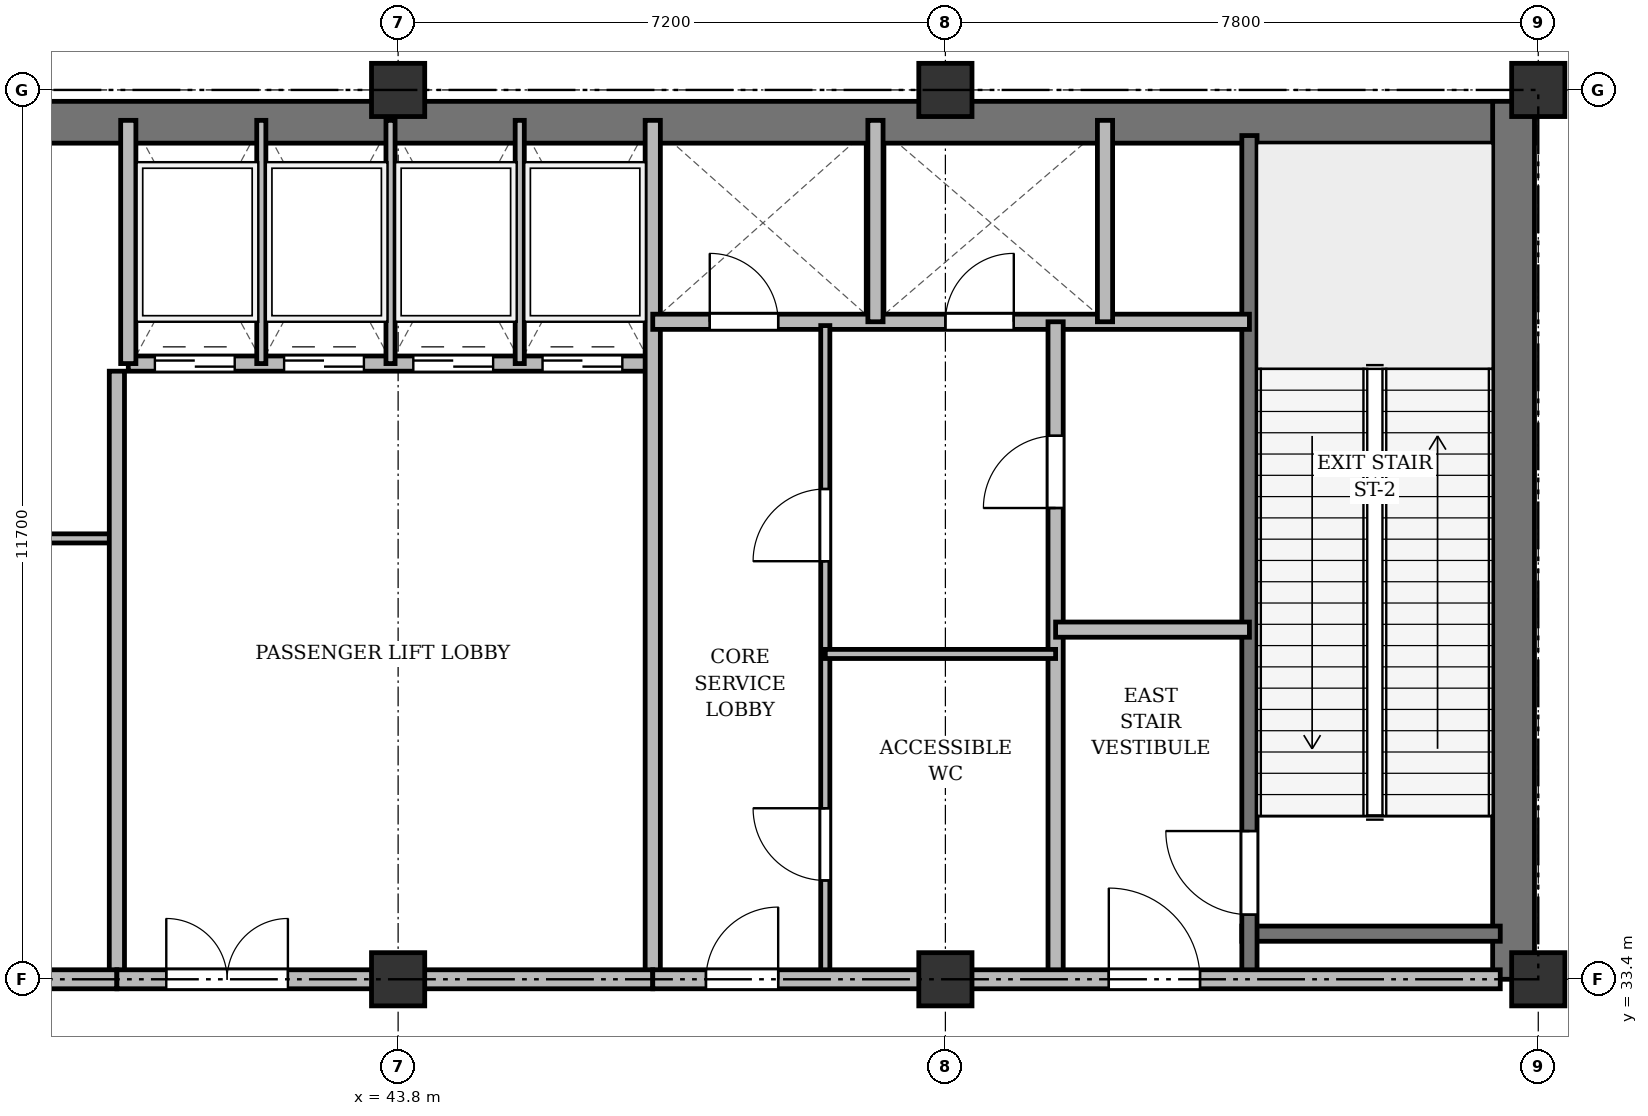
"""IFC4 building model, lengths in metres.
Left out: names, types, materials, properties, quantities, classifications, styles, units other than length and angle.
Written with IfcOpenShell. Run it as: python <this file> out.ifc"""

import sys

from ifc_helpers import new_model, si_unit, direction, frame, frame_2d, origin, origin_2d, place, context, subcontext, project, spatial, rectangle, extrude, source, transform, mapped, element, fill, save


model = new_model("IFC4")
c1 = context("Model", 3, precision=1e-05, world=origin(), true_north=direction((0.0, 1.0)))
c2 = subcontext(c1, "Body", "Model", "MODEL_VIEW")
j1 = project(units=[si_unit("LENGTHUNIT", "METRE"), si_unit("PLANEANGLEUNIT", "RADIAN")], contexts=[c1])
p1 = place(None, origin())
s1 = spatial("IfcSite", under=j1, at=p1, CompositionType="ELEMENT")
p2 = place(p1, origin())
s2 = spatial("IfcBuilding", under=s1, at=p2, CompositionType="ELEMENT")
p3 = place(p2, frame((0.0, 0.0, 240.9)))
s3 = spatial("IfcBuildingStorey", under=s2, at=p3, CompositionType="ELEMENT", Elevation=240.9)
m1 = source(origin(), c2, "Body", "SweptSolid", [
    extrude(rectangle(XDim=0.7, YDim=0.7, at=origin_2d()), origin(), (0.0, 0.0, 1.0), 7.8),
])
for number, where, z_axis, x_axis in (
    (1, (43.8, 33.4, 0.0), (0.0, 0.0, 1.0), (1.0, 0.0, 0.0)),
    (2, (43.8, 45.1, 0.0), (0.0, 0.0, 1.0), (1.0, 0.0, 0.0)),
    (3, (51.0, 33.4, 0.0), (0.0, 0.0, 1.0), (1.0, 0.0, 0.0)),
    (4, (51.0, 45.1, 0.0), (0.0, 0.0, 1.0), (1.0, 0.0, 0.0)),
    (5, (58.8, 33.4, 0.0), (0.0, 0.0, 1.0), (1.0, 0.0, 0.0)),
    (6, (58.8, 45.1, 0.0), (0.0, 0.0, 1.0), (1.0, 0.0, 0.0)),
):
    element("IfcColumn", number, at=place(p3, frame(where, z_axis=z_axis, x_axis=x_axis)), inside=s3, PredefinedType="COLUMN", context=c2, shape_type="MappedRepresentation", body=[
        mapped(m1, transform((0.0, 0.0, 0.0), x_axis=(1.0, 0.0, 0.0), y_axis=(0.0, 1.0, 0.0), z_axis=(0.0, 0.0, 1.0), scale=1.0)),
    ])
p4 = place(p3, frame((15.65, 44.675, 0.0), z_axis=(0.0, 0.0, 1.0), x_axis=(1.0, 0.0, 0.0)))
e7 = element("IfcWall", 7, at=p4, inside=s3, PredefinedType="SHEAR", context=c2, shape_type="SweptSolid", body=[
    extrude(rectangle(XDim=43.1, YDim=0.55, at=frame_2d((21.55, 0.0))), origin(), (0.0, 0.0, 1.0), 7.44),
])
p5 = place(p3, frame((58.475, 33.4, 0.0), z_axis=(0.0, 0.0, 1.0), x_axis=(0.0, 1.0, 0.0)))
e8 = element("IfcWall", 8, at=p5, inside=s3, PredefinedType="SHEAR", context=c2, shape_type="SweptSolid", body=[
    extrude(rectangle(XDim=11.55, YDim=0.55, at=frame_2d((5.775, 0.0))), origin(), (0.0, 0.0, 1.0), 7.44),
])
p6 = place(p3, frame((54.9, 34.0, 0.0), z_axis=(0.0, 0.0, 1.0), x_axis=(1.0, 0.0, 0.0)))
e9 = element("IfcWall", 9, at=p6, inside=s3, PredefinedType="SHEAR", context=c2, shape_type="SweptSolid", body=[
    extrude(rectangle(XDim=3.4, YDim=0.2, at=frame_2d((1.7, 0.0))), origin(), (0.0, 0.0, 1.0), 7.44),
])
p7 = place(p3, frame((55.0, 33.4, 0.0), z_axis=(0.0, 0.0, 1.0), x_axis=(0.0, 1.0, 0.0)))
e10 = element("IfcWall", 10, at=p7, inside=s3, PredefinedType="SHEAR", context=c2, shape_type="SweptSolid", body=[
    extrude(rectangle(XDim=11.1, YDim=0.2, at=frame_2d((5.55, 0.0))), origin(), (0.0, 0.0, 1.0), 7.44),
])
p8 = place(p7, frame((0.85, 0.0, 0.0)))
e11 = element("IfcOpeningElement", 11, at=p8, cuts=e10, PredefinedType="OPENING", context=c2, shape_type="SweptSolid", body=[
    extrude(rectangle(XDim=1.1, YDim=2.15, at=frame_2d((0.55, 1.075))), frame((0.0, 0.11, 0.0), z_axis=(0.0, -1.0, 0.0), x_axis=(1.0, 0.0, 0.0)), (0.0, 0.0, 1.0), 0.22),
])
p9 = place(p3, frame((33.3, 39.2, 0.0), z_axis=(0.0, 0.0, 1.0), x_axis=(1.0, 0.0, 0.0)))
e12 = element("IfcWall", 12, at=p9, inside=s3, PredefinedType="PARTITIONING", context=c2, shape_type="SweptSolid", body=[
    extrude(rectangle(XDim=6.8, YDim=0.12, at=frame_2d((3.4, 0.0))), origin(), (0.0, 0.0, 1.0), 7.44),
])
p10 = place(p9, frame((2.6, 0.0, 0.0)))
e13 = element("IfcOpeningElement", 13, at=p10, cuts=e12, PredefinedType="OPENING", context=c2, shape_type="SweptSolid", body=[
    extrude(rectangle(XDim=0.95, YDim=2.15, at=frame_2d((0.475, 1.075))), frame((0.0, 0.07, 0.0), z_axis=(0.0, -1.0, 0.0), x_axis=(1.0, 0.0, 0.0)), (0.0, 0.0, 1.0), 0.14),
])
p11 = place(p3, frame((40.1, 33.4, 0.0), z_axis=(0.0, 0.0, 1.0), x_axis=(0.0, 1.0, 0.0)))
e14 = element("IfcWall", 14, at=p11, inside=s3, PredefinedType="SOLIDWALL", context=c2, shape_type="SweptSolid", body=[
    extrude(rectangle(XDim=8.0, YDim=0.2, at=frame_2d((4.0, 0.0))), origin(), (0.0, 0.0, 1.0), 6.99),
])
p12 = place(p3, frame((40.25, 41.5, 0.0), z_axis=(0.0, 0.0, 1.0), x_axis=(1.0, 0.0, 0.0)))
e15 = element("IfcWall", 15, at=p12, inside=s3, PredefinedType="SOLIDWALL", context=c2, shape_type="SweptSolid", body=[
    extrude(rectangle(XDim=6.9, YDim=0.2, at=frame_2d((3.45, 0.0))), origin(), (0.0, 0.0, 1.0), 7.44),
])
p13 = place(p12, frame((0.35, 0.0, 0.0)))
e16 = element("IfcOpeningElement", 16, at=p13, cuts=e15, PredefinedType="OPENING", context=c2, shape_type="SweptSolid", body=[
    extrude(rectangle(XDim=1.05, YDim=2.15, at=frame_2d((0.525, 1.075))), frame((0.0, 0.11, 0.0), z_axis=(0.0, -1.0, 0.0), x_axis=(1.0, 0.0, 0.0)), (0.0, 0.0, 1.0), 0.22),
])
p14 = place(p12, frame((2.05, 0.0, 0.0)))
e17 = element("IfcOpeningElement", 17, at=p14, cuts=e15, PredefinedType="OPENING", context=c2, shape_type="SweptSolid", body=[
    extrude(rectangle(XDim=1.05, YDim=2.15, at=frame_2d((0.525, 1.075))), frame((0.0, 0.11, 0.0), z_axis=(0.0, -1.0, 0.0), x_axis=(1.0, 0.0, 0.0)), (0.0, 0.0, 1.0), 0.22),
])
p15 = place(p12, frame((3.75, 0.0, 0.0)))
e18 = element("IfcOpeningElement", 18, at=p15, cuts=e15, PredefinedType="OPENING", context=c2, shape_type="SweptSolid", body=[
    extrude(rectangle(XDim=1.05, YDim=2.15, at=frame_2d((0.525, 1.075))), frame((0.0, 0.11, 0.0), z_axis=(0.0, -1.0, 0.0), x_axis=(1.0, 0.0, 0.0)), (0.0, 0.0, 1.0), 0.22),
])
p16 = place(p12, frame((5.45, 0.0, 0.0)))
e19 = element("IfcOpeningElement", 19, at=p16, cuts=e15, PredefinedType="OPENING", context=c2, shape_type="SweptSolid", body=[
    extrude(rectangle(XDim=1.05, YDim=2.15, at=frame_2d((0.525, 1.075))), frame((0.0, 0.11, 0.0), z_axis=(0.0, -1.0, 0.0), x_axis=(1.0, 0.0, 0.0)), (0.0, 0.0, 1.0), 0.22),
])
p17 = place(p3, frame((40.25, 41.5, 0.0), z_axis=(0.0, 0.0, 1.0), x_axis=(0.0, 1.0, 0.0)))
e20 = element("IfcWall", 20, at=p17, inside=s3, PredefinedType="SOLIDWALL", context=c2, shape_type="SweptSolid", body=[
    extrude(rectangle(XDim=3.2, YDim=0.2, at=frame_2d((1.6, 0.0))), origin(), (0.0, 0.0, 1.0), 7.44),
])
for number, where, z_axis, x_axis in (
    (21, (42.0, 41.5, 0.0), (0.0, 0.0, 1.0), (0.0, 1.0, 0.0)),
    (22, (43.7, 41.5, 0.0), (0.0, 0.0, 1.0), (0.0, 1.0, 0.0)),
    (23, (45.4, 41.5, 0.0), (0.0, 0.0, 1.0), (0.0, 1.0, 0.0)),
):
    element("IfcWall", number, at=place(p3, frame(where, z_axis=z_axis, x_axis=x_axis)), inside=s3, PredefinedType="PARTITIONING", context=c2, shape_type="SweptSolid", body=[
        extrude(rectangle(XDim=3.2, YDim=0.12, at=frame_2d((1.6, 0.0))), origin(), (0.0, 0.0, 1.0), 7.44),
    ])
p18 = place(p3, frame((47.15, 33.4, 0.0), z_axis=(0.0, 0.0, 1.0), x_axis=(0.0, 1.0, 0.0)))
e24 = element("IfcWall", 24, at=p18, inside=s3, PredefinedType="SOLIDWALL", context=c2, shape_type="SweptSolid", body=[
    extrude(rectangle(XDim=11.3, YDim=0.2, at=frame_2d((5.65, 0.0))), origin(), (0.0, 0.0, 1.0), 6.99),
])
p19 = place(p3, frame((33.3, 33.4, 0.0), z_axis=(0.0, 0.0, 1.0), x_axis=(1.0, 0.0, 0.0)))
e25 = element("IfcWall", 25, at=p19, inside=s3, PredefinedType="PARTITIONING", context=c2, shape_type="SweptSolid", body=[
    extrude(rectangle(XDim=6.8, YDim=0.25, at=frame_2d((3.4, 0.0))), origin(), (0.0, 0.0, 1.0), 6.99),
])
p20 = place(p19, frame((2.4, 0.0, 0.0)))
e26 = element("IfcOpeningElement", 26, at=p20, cuts=e25, PredefinedType="OPENING", context=c2, shape_type="SweptSolid", body=[
    extrude(rectangle(XDim=1.0, YDim=2.15, at=frame_2d((0.5, 1.075))), frame((0.0, 0.135, 0.0), z_axis=(0.0, -1.0, 0.0), x_axis=(1.0, 0.0, 0.0)), (0.0, 0.0, 1.0), 0.27),
])
p21 = place(p3, frame((40.1, 33.4, 0.0), z_axis=(0.0, 0.0, 1.0), x_axis=(1.0, 0.0, 0.0)))
e27 = element("IfcWall", 27, at=p21, inside=s3, PredefinedType="PARTITIONING", context=c2, shape_type="SweptSolid", body=[
    extrude(rectangle(XDim=7.05, YDim=0.25, at=frame_2d((3.525, 0.0))), origin(), (0.0, 0.0, 1.0), 6.99),
])
p22 = place(p21, frame((0.65, 0.0, 0.0)))
e28 = element("IfcOpeningElement", 28, at=p22, cuts=e27, PredefinedType="OPENING", context=c2, shape_type="SweptSolid", body=[
    extrude(rectangle(XDim=1.6, YDim=2.2, at=frame_2d((0.8, 1.1))), frame((0.0, 0.135, 0.0), z_axis=(0.0, -1.0, 0.0), x_axis=(1.0, 0.0, 0.0)), (0.0, 0.0, 1.0), 0.27),
])
p23 = place(p3, frame((47.15, 42.05, 0.0), z_axis=(0.0, 0.0, 1.0), x_axis=(1.0, 0.0, 0.0)))
e29 = element("IfcWall", 29, at=p23, inside=s3, PredefinedType="SOLIDWALL", context=c2, shape_type="SweptSolid", body=[
    extrude(rectangle(XDim=7.85, YDim=0.2, at=frame_2d((3.925, 0.0))), origin(), (0.0, 0.0, 1.0), 6.94),
])
p24 = place(p23, frame((0.75, 0.0, 0.0)))
e30 = element("IfcOpeningElement", 30, at=p24, cuts=e29, PredefinedType="OPENING", context=c2, shape_type="SweptSolid", body=[
    extrude(rectangle(XDim=0.9, YDim=2.1, at=frame_2d((0.45, 1.05))), frame((0.0, 0.11, 0.0), z_axis=(0.0, -1.0, 0.0), x_axis=(1.0, 0.0, 0.0)), (0.0, 0.0, 1.0), 0.22),
])
p25 = place(p23, frame((3.85, 0.0, 0.0)))
e31 = element("IfcOpeningElement", 31, at=p25, cuts=e29, PredefinedType="OPENING", context=c2, shape_type="SweptSolid", body=[
    extrude(rectangle(XDim=0.9, YDim=2.1, at=frame_2d((0.45, 1.05))), frame((0.0, 0.11, 0.0), z_axis=(0.0, -1.0, 0.0), x_axis=(1.0, 0.0, 0.0)), (0.0, 0.0, 1.0), 0.22),
])
for number, where, z_axis, x_axis in (
    (32, (50.08, 42.05, 0.0), (0.0, 0.0, 1.0), (0.0, 1.0, 0.0)),
    (33, (53.1, 42.05, 0.0), (0.0, 0.0, 1.0), (0.0, 1.0, 0.0)),
):
    element("IfcWall", number, at=place(p3, frame(where, z_axis=z_axis, x_axis=x_axis)), inside=s3, PredefinedType="SOLIDWALL", context=c2, shape_type="SweptSolid", body=[
        extrude(rectangle(XDim=2.65, YDim=0.2, at=frame_2d((1.325, 0.0))), origin(), (0.0, 0.0, 1.0), 7.44),
    ])
p26 = place(p3, frame((52.45, 33.4, 0.0), z_axis=(0.0, 0.0, 1.0), x_axis=(0.0, 1.0, 0.0)))
e34 = element("IfcWall", 34, at=p26, inside=s3, PredefinedType="PARTITIONING", context=c2, shape_type="SweptSolid", body=[
    extrude(rectangle(XDim=8.65, YDim=0.2, at=frame_2d((4.325, 0.0))), origin(), (0.0, 0.0, 1.0), 6.99),
])
p27 = place(p26, frame((6.2, 0.0, 0.0)))
e35 = element("IfcOpeningElement", 35, at=p27, cuts=e34, PredefinedType="OPENING", context=c2, shape_type="SweptSolid", body=[
    extrude(rectangle(XDim=0.95, YDim=2.15, at=frame_2d((0.475, 1.075))), frame((0.0, 0.11, 0.0), z_axis=(0.0, -1.0, 0.0), x_axis=(1.0, 0.0, 0.0)), (0.0, 0.0, 1.0), 0.22),
])
p28 = place(p3, frame((52.45, 38.0, 0.0), z_axis=(0.0, 0.0, 1.0), x_axis=(1.0, 0.0, 0.0)))
e36 = element("IfcWall", 36, at=p28, inside=s3, PredefinedType="PARTITIONING", context=c2, shape_type="SweptSolid", body=[
    extrude(rectangle(XDim=2.55, YDim=0.2, at=frame_2d((1.275, 0.0))), origin(), (0.0, 0.0, 1.0), 7.44),
])
p29 = place(p3, frame((49.42, 33.4, 0.0), z_axis=(0.0, 0.0, 1.0), x_axis=(0.0, 1.0, 0.0)))
e37 = element("IfcWall", 37, at=p29, inside=s3, PredefinedType="PARTITIONING", context=c2, shape_type="SweptSolid", body=[
    extrude(rectangle(XDim=8.6, YDim=0.12, at=frame_2d((4.3, 0.0))), origin(), (0.0, 0.0, 1.0), 6.99),
])
p30 = place(p29, frame((1.3, 0.0, 0.0)))
e38 = element("IfcOpeningElement", 38, at=p30, cuts=e37, PredefinedType="OPENING", context=c2, shape_type="SweptSolid", body=[
    extrude(rectangle(XDim=0.95, YDim=2.15, at=frame_2d((0.475, 1.075))), frame((0.0, 0.07, 0.0), z_axis=(0.0, -1.0, 0.0), x_axis=(1.0, 0.0, 0.0)), (0.0, 0.0, 1.0), 0.14),
])
p31 = place(p29, frame((5.5, 0.0, 0.0)))
e39 = element("IfcOpeningElement", 39, at=p31, cuts=e37, PredefinedType="OPENING", context=c2, shape_type="SweptSolid", body=[
    extrude(rectangle(XDim=0.95, YDim=2.15, at=frame_2d((0.475, 1.075))), frame((0.0, 0.07, 0.0), z_axis=(0.0, -1.0, 0.0), x_axis=(1.0, 0.0, 0.0)), (0.0, 0.0, 1.0), 0.14),
])
p32 = place(p3, frame((49.42, 37.68, 0.0), z_axis=(0.0, 0.0, 1.0), x_axis=(1.0, 0.0, 0.0)))
e40 = element("IfcWall", 40, at=p32, inside=s3, PredefinedType="PARTITIONING", context=c2, shape_type="SweptSolid", body=[
    extrude(rectangle(XDim=3.03, YDim=0.12, at=frame_2d((1.515, 0.0))), origin(), (0.0, 0.0, 1.0), 6.94),
])
p33 = place(p3, frame((47.15, 33.4, 0.0), z_axis=(0.0, 0.0, 1.0), x_axis=(1.0, 0.0, 0.0)))
e41 = element("IfcWall", 41, at=p33, inside=s3, PredefinedType="PARTITIONING", context=c2, shape_type="SweptSolid", body=[
    extrude(rectangle(XDim=11.15, YDim=0.25, at=frame_2d((5.575, 0.0))), origin(), (0.0, 0.0, 1.0), 6.99),
])
p34 = place(p33, frame((0.7, 0.0, 0.0)))
e42 = element("IfcOpeningElement", 42, at=p34, cuts=e41, PredefinedType="OPENING", context=c2, shape_type="SweptSolid", body=[
    extrude(rectangle(XDim=0.95, YDim=2.15, at=frame_2d((0.475, 1.075))), frame((0.0, 0.135, 0.0), z_axis=(0.0, -1.0, 0.0), x_axis=(1.0, 0.0, 0.0)), (0.0, 0.0, 1.0), 0.27),
])
p35 = place(p33, frame((6.0, 0.0, 0.0)))
e43 = element("IfcOpeningElement", 43, at=p35, cuts=e41, PredefinedType="OPENING", context=c2, shape_type="SweptSolid", body=[
    extrude(rectangle(XDim=1.2, YDim=2.15, at=frame_2d((0.6, 1.075))), frame((0.0, 0.135, 0.0), z_axis=(0.0, -1.0, 0.0), x_axis=(1.0, 0.0, 0.0)), (0.0, 0.0, 1.0), 0.27),
])
m2 = source(origin(), c2, "Body", "SweptSolid", [
    extrude(rectangle(XDim=1.1, YDim=2.15, at=frame_2d((0.55, 1.075))), frame((0.0, 0.025, 0.0), z_axis=(0.0, -1.0, 0.0), x_axis=(1.0, 0.0, 0.0)), (0.0, 0.0, 1.0), 0.05),
])
p36 = place(p8, origin())
e44 = element("IfcDoor", 44, at=p36, inside=s3, OperationType="SINGLE_SWING_RIGHT", PredefinedType="DOOR", context=c2, shape_type="MappedRepresentation", body=[
    mapped(m2, transform((0.0, 0.0, 0.0), x_axis=(1.0, 0.0, 0.0), y_axis=(0.0, 1.0, 0.0), z_axis=(0.0, 0.0, 1.0), scale=1.0)),
])
fill(e11, e44)
m3 = source(origin(), c2, "Body", "SweptSolid", [
    extrude(rectangle(XDim=1.05, YDim=2.15, at=frame_2d((0.525, 1.075))), frame((0.0, 0.025, 0.0), z_axis=(0.0, -1.0, 0.0), x_axis=(1.0, 0.0, 0.0)), (0.0, 0.0, 1.0), 0.05),
])
p37 = place(p13, origin())
e45 = element("IfcDoor", 45, at=p37, inside=s3, OperationType="DOUBLE_DOOR_SLIDING", PredefinedType="DOOR", context=c2, shape_type="MappedRepresentation", body=[
    mapped(m3, transform((0.0, 0.0, 0.0), x_axis=(1.0, 0.0, 0.0), y_axis=(0.0, 1.0, 0.0), z_axis=(0.0, 0.0, 1.0), scale=1.0)),
])
fill(e16, e45)
p38 = place(p14, origin())
e46 = element("IfcDoor", 46, at=p38, inside=s3, OperationType="DOUBLE_DOOR_SLIDING", PredefinedType="DOOR", context=c2, shape_type="MappedRepresentation", body=[
    mapped(m3, transform((0.0, 0.0, 0.0), x_axis=(1.0, 0.0, 0.0), y_axis=(0.0, 1.0, 0.0), z_axis=(0.0, 0.0, 1.0), scale=1.0)),
])
fill(e17, e46)
p39 = place(p15, origin())
e47 = element("IfcDoor", 47, at=p39, inside=s3, OperationType="DOUBLE_DOOR_SLIDING", PredefinedType="DOOR", context=c2, shape_type="MappedRepresentation", body=[
    mapped(m3, transform((0.0, 0.0, 0.0), x_axis=(1.0, 0.0, 0.0), y_axis=(0.0, 1.0, 0.0), z_axis=(0.0, 0.0, 1.0), scale=1.0)),
])
fill(e18, e47)
p40 = place(p16, origin())
e48 = element("IfcDoor", 48, at=p40, inside=s3, OperationType="DOUBLE_DOOR_SLIDING", PredefinedType="DOOR", context=c2, shape_type="MappedRepresentation", body=[
    mapped(m3, transform((0.0, 0.0, 0.0), x_axis=(1.0, 0.0, 0.0), y_axis=(0.0, 1.0, 0.0), z_axis=(0.0, 0.0, 1.0), scale=1.0)),
])
fill(e19, e48)
m4 = source(origin(), c2, "Body", "SweptSolid", [
    extrude(rectangle(XDim=1.6, YDim=2.2, at=frame_2d((0.8, 1.1))), frame((0.0, 0.025, 0.0), z_axis=(0.0, -1.0, 0.0), x_axis=(1.0, 0.0, 0.0)), (0.0, 0.0, 1.0), 0.05),
])
p41 = place(p22, origin())
e49 = element("IfcDoor", 49, at=p41, inside=s3, OperationType="DOUBLE_DOOR_SINGLE_SWING", PredefinedType="DOOR", context=c2, shape_type="MappedRepresentation", body=[
    mapped(m4, transform((0.0, 0.0, 0.0), x_axis=(1.0, 0.0, 0.0), y_axis=(0.0, 1.0, 0.0), z_axis=(0.0, 0.0, 1.0), scale=1.0)),
])
fill(e28, e49)
m5 = source(origin(), c2, "Body", "SweptSolid", [
    extrude(rectangle(XDim=0.9, YDim=2.1, at=frame_2d((0.45, 1.05))), frame((0.0, 0.025, 0.0), z_axis=(0.0, -1.0, 0.0), x_axis=(1.0, 0.0, 0.0)), (0.0, 0.0, 1.0), 0.05),
])
p42 = place(p24, origin())
e50 = element("IfcDoor", 50, at=p42, inside=s3, OperationType="SINGLE_SWING_LEFT", PredefinedType="DOOR", context=c2, shape_type="MappedRepresentation", body=[
    mapped(m5, transform((0.0, 0.0, 0.0), x_axis=(1.0, 0.0, 0.0), y_axis=(0.0, 1.0, 0.0), z_axis=(0.0, 0.0, 1.0), scale=1.0)),
])
fill(e30, e50)
p43 = place(p25, origin())
e51 = element("IfcDoor", 51, at=p43, inside=s3, OperationType="SINGLE_SWING_RIGHT", PredefinedType="DOOR", context=c2, shape_type="MappedRepresentation", body=[
    mapped(m5, transform((0.0, 0.0, 0.0), x_axis=(1.0, 0.0, 0.0), y_axis=(0.0, 1.0, 0.0), z_axis=(0.0, 0.0, 1.0), scale=1.0)),
])
fill(e31, e51)
m6 = source(origin(), c2, "Body", "SweptSolid", [
    extrude(rectangle(XDim=0.95, YDim=2.15, at=frame_2d((0.475, 1.075))), frame((0.0, 0.025, 0.0), z_axis=(0.0, -1.0, 0.0), x_axis=(1.0, 0.0, 0.0)), (0.0, 0.0, 1.0), 0.05),
])
p44 = place(p27, origin())
e52 = element("IfcDoor", 52, at=p44, inside=s3, OperationType="SINGLE_SWING_LEFT", PredefinedType="DOOR", context=c2, shape_type="MappedRepresentation", body=[
    mapped(m6, transform((0.0, 0.0, 0.0), x_axis=(1.0, 0.0, 0.0), y_axis=(0.0, 1.0, 0.0), z_axis=(0.0, 0.0, 1.0), scale=1.0)),
])
fill(e35, e52)
p45 = place(p30, origin())
e53 = element("IfcDoor", 53, at=p45, inside=s3, OperationType="SINGLE_SWING_RIGHT", PredefinedType="DOOR", context=c2, shape_type="MappedRepresentation", body=[
    mapped(m6, transform((0.0, 0.0, 0.0), x_axis=(1.0, 0.0, 0.0), y_axis=(0.0, 1.0, 0.0), z_axis=(0.0, 0.0, 1.0), scale=1.0)),
])
fill(e38, e53)
p46 = place(p31, origin())
e54 = element("IfcDoor", 54, at=p46, inside=s3, OperationType="SINGLE_SWING_LEFT", PredefinedType="DOOR", context=c2, shape_type="MappedRepresentation", body=[
    mapped(m6, transform((0.0, 0.0, 0.0), x_axis=(1.0, 0.0, 0.0), y_axis=(0.0, 1.0, 0.0), z_axis=(0.0, 0.0, 1.0), scale=1.0)),
])
fill(e39, e54)
p47 = place(p34, origin())
e55 = element("IfcDoor", 55, at=p47, inside=s3, OperationType="SINGLE_SWING_RIGHT", PredefinedType="DOOR", context=c2, shape_type="MappedRepresentation", body=[
    mapped(m6, transform((0.0, 0.0, 0.0), x_axis=(1.0, 0.0, 0.0), y_axis=(0.0, 1.0, 0.0), z_axis=(0.0, 0.0, 1.0), scale=1.0)),
])
fill(e42, e55)
m7 = source(origin(), c2, "Body", "SweptSolid", [
    extrude(rectangle(XDim=1.2, YDim=2.15, at=frame_2d((0.6, 1.075))), frame((0.0, 0.025, 0.0), z_axis=(0.0, -1.0, 0.0), x_axis=(1.0, 0.0, 0.0)), (0.0, 0.0, 1.0), 0.05),
])
p48 = place(p35, origin())
e56 = element("IfcDoor", 56, at=p48, inside=s3, OperationType="SINGLE_SWING_LEFT", PredefinedType="DOOR", context=c2, shape_type="MappedRepresentation", body=[
    mapped(m7, transform((0.0, 0.0, 0.0), x_axis=(1.0, 0.0, 0.0), y_axis=(0.0, 1.0, 0.0), z_axis=(0.0, 0.0, 1.0), scale=1.0)),
])
fill(e43, e56)
save(model, sys.argv[1])
